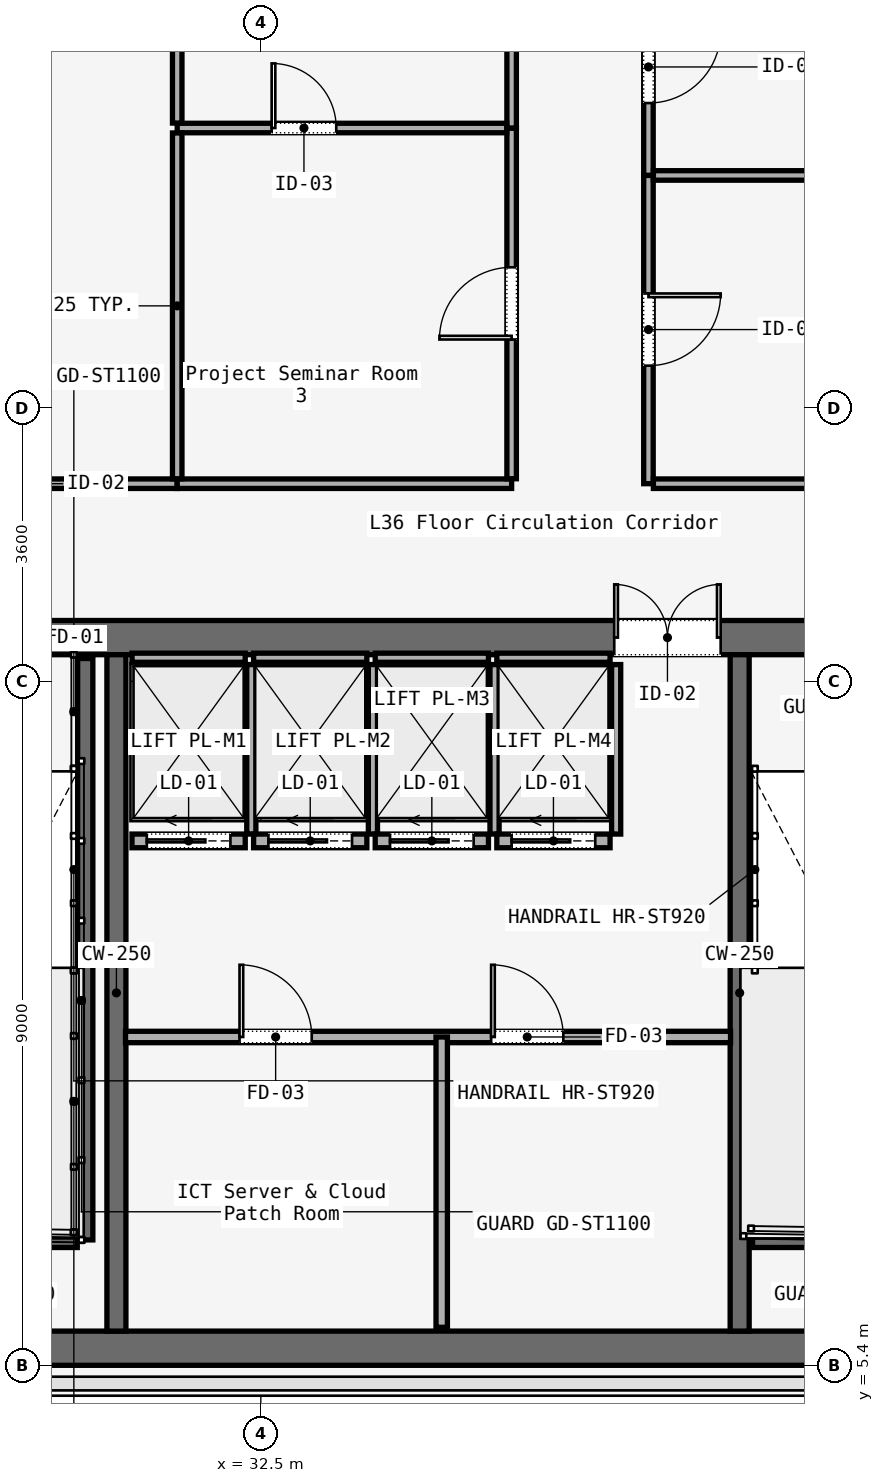
"""IFC4 building model, lengths in metres.
Left out: names, types, materials, properties, quantities, classifications, styles, units other than length and angle.
Written with IfcOpenShell. Run it as: python <this file> out.ifc"""

import sys

from ifc_helpers import new_model, si_unit, direction, frame, frame_2d, origin, place, context, subcontext, project, spatial, rectangle, extrude, element, fill, save


model = new_model("IFC4")
c1 = context("Model", 3, precision=1e-05, world=origin(), true_north=direction((0.0, 1.0)))
c2 = subcontext(c1, "Body", "Model", "MODEL_VIEW")
j1 = project(units=[si_unit("LENGTHUNIT", "METRE"), si_unit("PLANEANGLEUNIT", "RADIAN")], contexts=[c1])
p1 = place(None, origin())
s1 = spatial("IfcSite", under=j1, at=p1, CompositionType="ELEMENT")
p2 = place(p1, origin())
s2 = spatial("IfcBuilding", under=s1, at=p2, CompositionType="ELEMENT")
p3 = place(p2, frame((0.0, 0.0, 153.6)))
s3 = spatial("IfcBuildingStorey", under=s2, at=p3, CompositionType="ELEMENT", Elevation=153.6)
p4 = place(p3, frame((26.45, 14.975, 0.0), z_axis=(0.0, 0.0, 1.0), x_axis=(1.0, 0.0, 0.0)))
e1 = element("IfcWall", 1, at=p4, inside=s3, PredefinedType="SOLIDWALL", context=c2, shape_type="SweptSolid", body=[
    extrude(rectangle(XDim=31.1, YDim=0.45, at=frame_2d((15.55, 0.0))), origin(), (0.0, 0.0, 1.0), 3.58),
])
p5 = place(p4, frame((1.65, 0.0, 0.0)))
e2 = element("IfcOpeningElement", 2, at=p5, cuts=e1, PredefinedType="OPENING", context=c2, shape_type="SweptSolid", body=[
    extrude(rectangle(XDim=1.1, YDim=2.2, at=frame_2d((0.55, 1.1))), frame((0.0, 0.225, 0.0), z_axis=(0.0, -1.0, 0.0), x_axis=(1.0, 0.0, 0.0)), (0.0, 0.0, 1.0), 0.45),
])
p6 = place(p4, frame((13.65, 0.0, 0.0)))
e3 = element("IfcOpeningElement", 3, at=p6, cuts=e1, PredefinedType="OPENING", context=c2, shape_type="SweptSolid", body=[
    extrude(rectangle(XDim=1.1, YDim=2.2, at=frame_2d((0.55, 1.1))), frame((0.0, 0.225, 0.0), z_axis=(0.0, -1.0, 0.0), x_axis=(1.0, 0.0, 0.0)), (0.0, 0.0, 1.0), 0.45),
])
p7 = place(p4, frame((25.55, 0.0, 0.0)))
e4 = element("IfcOpeningElement", 4, at=p7, cuts=e1, PredefinedType="OPENING", context=c2, shape_type="SweptSolid", body=[
    extrude(rectangle(XDim=1.1, YDim=2.2, at=frame_2d((0.55, 1.1))), frame((0.0, 0.225, 0.0), z_axis=(0.0, -1.0, 0.0), x_axis=(1.0, 0.0, 0.0)), (0.0, 0.0, 1.0), 0.45),
])
p8 = place(p4, frame((10.7, 0.0, 0.0)))
e5 = element("IfcOpeningElement", 5, at=p8, cuts=e1, PredefinedType="OPENING", context=c2, shape_type="SweptSolid", body=[
    extrude(rectangle(XDim=1.4, YDim=2.2, at=frame_2d((0.7, 1.1))), frame((0.0, 0.225, 0.0), z_axis=(0.0, -1.0, 0.0), x_axis=(1.0, 0.0, 0.0)), (0.0, 0.0, 1.0), 0.45),
])
p9 = place(p4, frame((19.35, 0.0, 0.0)))
e6 = element("IfcOpeningElement", 6, at=p9, cuts=e1, PredefinedType="OPENING", context=c2, shape_type="SweptSolid", body=[
    extrude(rectangle(XDim=1.1, YDim=2.2, at=frame_2d((0.55, 1.1))), frame((0.0, 0.225, 0.0), z_axis=(0.0, -1.0, 0.0), x_axis=(1.0, 0.0, 0.0)), (0.0, 0.0, 1.0), 0.45),
])
p10 = place(p4, frame((21.4, 0.0, 0.0)))
e7 = element("IfcOpeningElement", 7, at=p10, cuts=e1, PredefinedType="OPENING", context=c2, shape_type="SweptSolid", body=[
    extrude(rectangle(XDim=0.9, YDim=2.1, at=frame_2d((0.45, 1.05))), frame((0.0, 0.225, 0.0), z_axis=(0.0, -1.0, 0.0), x_axis=(1.0, 0.0, 0.0)), (0.0, 0.0, 1.0), 0.45),
])
p11 = place(p4, frame((23.35, 0.0, 0.0)))
e8 = element("IfcOpeningElement", 8, at=p11, cuts=e1, PredefinedType="OPENING", context=c2, shape_type="SweptSolid", body=[
    extrude(rectangle(XDim=1.3, YDim=2.3, at=frame_2d((0.65, 1.15))), frame((0.0, 0.225, 0.0), z_axis=(0.0, -1.0, 0.0), x_axis=(1.0, 0.0, 0.0)), (0.0, 0.0, 1.0), 0.45),
])
p12 = place(p3, frame((26.45, 5.625, 0.0), z_axis=(0.0, 0.0, 1.0), x_axis=(1.0, 0.0, 0.0)))
e9 = element("IfcWall", 9, at=p12, inside=s3, PredefinedType="SOLIDWALL", context=c2, shape_type="SweptSolid", body=[
    extrude(rectangle(XDim=31.1, YDim=0.45, at=frame_2d((15.55, 0.0))), origin(), (0.0, 0.0, 1.0), 3.58),
])
for number, where, z_axis, x_axis in (
    (10, (30.6, 5.85, 0.0), (0.0, 0.0, 1.0), (0.0, 1.0, 0.0)),
    (11, (38.8, 5.85, 0.0), (0.0, 0.0, 1.0), (0.0, 1.0, 0.0)),
):
    element("IfcWall", number, at=place(p3, frame(where, z_axis=z_axis, x_axis=x_axis)), inside=s3, PredefinedType="SOLIDWALL", context=c2, shape_type="SweptSolid", body=[
        extrude(rectangle(XDim=8.9, YDim=0.25, at=frame_2d((4.45, 0.0))), origin(), (0.0, 0.0, 1.0), 3.58),
    ])
p13 = place(p3, frame((30.19, 14.7, 0.0), z_axis=(0.0, 0.0, 1.0), x_axis=(0.0, -1.0, 0.0)))
e12 = element("IfcWall", 12, at=p13, inside=s3, PredefinedType="SOLIDWALL", context=c2, shape_type="SweptSolid", body=[
    extrude(rectangle(XDim=7.65, YDim=0.2, at=frame_2d((3.825, 0.0))), origin(), (0.0, 0.0, 1.0), 3.8),
])
for number, where, z_axis, x_axis in (
    (13, (26.97, 7.05, 0.0), (0.0, 0.0, 1.0), (1.0, 0.0, 0.0)),
    (14, (38.97, 7.05, 0.0), (0.0, 0.0, 1.0), (1.0, 0.0, 0.0)),
):
    element("IfcWall", number, at=place(p3, frame(where, z_axis=z_axis, x_axis=x_axis)), inside=s3, PredefinedType="SOLIDWALL", context=c2, shape_type="SweptSolid", body=[
        extrude(rectangle(XDim=3.115, YDim=0.2, at=frame_2d((1.558, 0.0))), origin(), (0.0, 0.0, 1.0), 3.8),
    ])
p14 = place(p3, frame((30.72, 9.72, 0.0), z_axis=(0.0, 0.0, 1.0), x_axis=(1.0, 0.0, 0.0)))
e15 = element("IfcWall", 15, at=p14, inside=s3, PredefinedType="PARTITIONING", context=c2, shape_type="SweptSolid", body=[
    extrude(rectangle(XDim=7.96, YDim=0.15, at=frame_2d((3.98, 0.0))), origin(), (0.0, 0.0, 1.0), 3.01),
])
p15 = place(p14, frame((1.5, 0.0, 0.0)))
e16 = element("IfcOpeningElement", 16, at=p15, cuts=e15, PredefinedType="OPENING", context=c2, shape_type="SweptSolid", body=[
    extrude(rectangle(XDim=0.95, YDim=2.2, at=frame_2d((0.475, 1.1))), frame((0.0, 0.075, 0.0), z_axis=(0.0, -1.0, 0.0), x_axis=(1.0, 0.0, 0.0)), (0.0, 0.0, 1.0), 0.15),
])
p16 = place(p14, frame((4.81, 0.0, 0.0)))
e17 = element("IfcOpeningElement", 17, at=p16, cuts=e15, PredefinedType="OPENING", context=c2, shape_type="SweptSolid", body=[
    extrude(rectangle(XDim=0.95, YDim=2.2, at=frame_2d((0.475, 1.1))), frame((0.0, 0.075, 0.0), z_axis=(0.0, -1.0, 0.0), x_axis=(1.0, 0.0, 0.0)), (0.0, 0.0, 1.0), 0.15),
])
p17 = place(p3, frame((34.88, 5.9, 0.0), z_axis=(0.0, 0.0, 1.0), x_axis=(0.0, 1.0, 0.0)))
e18 = element("IfcWall", 18, at=p17, inside=s3, PredefinedType="PARTITIONING", context=c2, shape_type="SweptSolid", body=[
    extrude(rectangle(XDim=3.82, YDim=0.15, at=frame_2d((1.91, 0.0))), origin(), (0.0, 0.0, 1.0), 3.01),
])
p18 = place(p3, frame((30.805, 12.3, 0.0), z_axis=(0.0, 0.0, 1.0), x_axis=(1.0, 0.0, 0.0)))
e19 = element("IfcWall", 19, at=p18, inside=s3, PredefinedType="SOLIDWALL", context=c2, shape_type="SweptSolid", body=[
    extrude(rectangle(XDim=1.49, YDim=0.18, at=frame_2d((0.745, 0.0))), origin(), (0.0, 0.0, 1.0), 3.01),
])
p19 = place(p18, frame((0.195, 0.0, 0.0)))
e20 = element("IfcOpeningElement", 20, at=p19, cuts=e19, PredefinedType="OPENING", context=c2, shape_type="SweptSolid", body=[
    extrude(rectangle(XDim=1.1, YDim=2.2, at=frame_2d((0.55, 1.1))), frame((0.0, 0.09, 0.0), z_axis=(0.0, -1.0, 0.0), x_axis=(1.0, 0.0, 0.0)), (0.0, 0.0, 1.0), 0.18),
])
p20 = place(p3, frame((30.805, 14.71, 0.0), z_axis=(0.0, 0.0, 1.0), x_axis=(1.0, 0.0, 0.0)))
e21 = element("IfcWall", 21, at=p20, inside=s3, PredefinedType="SOLIDWALL", context=c2, shape_type="SweptSolid", body=[
    extrude(rectangle(XDim=1.49, YDim=0.12, at=frame_2d((0.745, 0.0))), origin(), (0.0, 0.0, 1.0), 3.01),
])
p21 = place(p3, frame((32.375, 12.39, 0.0), z_axis=(0.0, 0.0, 1.0), x_axis=(0.0, 1.0, 0.0)))
e22 = element("IfcWall", 22, at=p21, inside=s3, PredefinedType="SOLIDWALL", context=c2, shape_type="SweptSolid", body=[
    extrude(rectangle(XDim=2.23, YDim=0.12, at=frame_2d((1.115, 0.0))), origin(), (0.0, 0.0, 1.0), 3.01),
])
p22 = place(p3, frame((32.405, 12.3, 0.0), z_axis=(0.0, 0.0, 1.0), x_axis=(1.0, 0.0, 0.0)))
e23 = element("IfcWall", 23, at=p22, inside=s3, PredefinedType="SOLIDWALL", context=c2, shape_type="SweptSolid", body=[
    extrude(rectangle(XDim=1.49, YDim=0.18, at=frame_2d((0.745, 0.0))), origin(), (0.0, 0.0, 1.0), 3.01),
])
p23 = place(p22, frame((0.195, 0.0, 0.0)))
e24 = element("IfcOpeningElement", 24, at=p23, cuts=e23, PredefinedType="OPENING", context=c2, shape_type="SweptSolid", body=[
    extrude(rectangle(XDim=1.1, YDim=2.2, at=frame_2d((0.55, 1.1))), frame((0.0, 0.09, 0.0), z_axis=(0.0, -1.0, 0.0), x_axis=(1.0, 0.0, 0.0)), (0.0, 0.0, 1.0), 0.18),
])
p24 = place(p3, frame((32.405, 14.71, 0.0), z_axis=(0.0, 0.0, 1.0), x_axis=(1.0, 0.0, 0.0)))
e25 = element("IfcWall", 25, at=p24, inside=s3, PredefinedType="SOLIDWALL", context=c2, shape_type="SweptSolid", body=[
    extrude(rectangle(XDim=1.49, YDim=0.12, at=frame_2d((0.745, 0.0))), origin(), (0.0, 0.0, 1.0), 3.01),
])
p25 = place(p3, frame((33.975, 12.39, 0.0), z_axis=(0.0, 0.0, 1.0), x_axis=(0.0, 1.0, 0.0)))
e26 = element("IfcWall", 26, at=p25, inside=s3, PredefinedType="SOLIDWALL", context=c2, shape_type="SweptSolid", body=[
    extrude(rectangle(XDim=2.23, YDim=0.12, at=frame_2d((1.115, 0.0))), origin(), (0.0, 0.0, 1.0), 3.01),
])
p26 = place(p3, frame((34.005, 12.3, 0.0), z_axis=(0.0, 0.0, 1.0), x_axis=(1.0, 0.0, 0.0)))
e27 = element("IfcWall", 27, at=p26, inside=s3, PredefinedType="SOLIDWALL", context=c2, shape_type="SweptSolid", body=[
    extrude(rectangle(XDim=1.49, YDim=0.18, at=frame_2d((0.745, 0.0))), origin(), (0.0, 0.0, 1.0), 3.01),
])
p27 = place(p26, frame((0.195, 0.0, 0.0)))
e28 = element("IfcOpeningElement", 28, at=p27, cuts=e27, PredefinedType="OPENING", context=c2, shape_type="SweptSolid", body=[
    extrude(rectangle(XDim=1.1, YDim=2.2, at=frame_2d((0.55, 1.1))), frame((0.0, 0.09, 0.0), z_axis=(0.0, -1.0, 0.0), x_axis=(1.0, 0.0, 0.0)), (0.0, 0.0, 1.0), 0.18),
])
p28 = place(p3, frame((34.005, 14.71, 0.0), z_axis=(0.0, 0.0, 1.0), x_axis=(1.0, 0.0, 0.0)))
e29 = element("IfcWall", 29, at=p28, inside=s3, PredefinedType="SOLIDWALL", context=c2, shape_type="SweptSolid", body=[
    extrude(rectangle(XDim=1.49, YDim=0.12, at=frame_2d((0.745, 0.0))), origin(), (0.0, 0.0, 1.0), 3.01),
])
p29 = place(p3, frame((35.575, 12.39, 0.0), z_axis=(0.0, 0.0, 1.0), x_axis=(0.0, 1.0, 0.0)))
e30 = element("IfcWall", 30, at=p29, inside=s3, PredefinedType="SOLIDWALL", context=c2, shape_type="SweptSolid", body=[
    extrude(rectangle(XDim=2.23, YDim=0.12, at=frame_2d((1.115, 0.0))), origin(), (0.0, 0.0, 1.0), 3.01),
])
p30 = place(p3, frame((35.605, 12.3, 0.0), z_axis=(0.0, 0.0, 1.0), x_axis=(1.0, 0.0, 0.0)))
e31 = element("IfcWall", 31, at=p30, inside=s3, PredefinedType="SOLIDWALL", context=c2, shape_type="SweptSolid", body=[
    extrude(rectangle(XDim=1.49, YDim=0.18, at=frame_2d((0.745, 0.0))), origin(), (0.0, 0.0, 1.0), 3.01),
])
p31 = place(p30, frame((0.195, 0.0, 0.0)))
e32 = element("IfcOpeningElement", 32, at=p31, cuts=e31, PredefinedType="OPENING", context=c2, shape_type="SweptSolid", body=[
    extrude(rectangle(XDim=1.1, YDim=2.2, at=frame_2d((0.55, 1.1))), frame((0.0, 0.09, 0.0), z_axis=(0.0, -1.0, 0.0), x_axis=(1.0, 0.0, 0.0)), (0.0, 0.0, 1.0), 0.18),
])
p32 = place(p3, frame((35.605, 14.71, 0.0), z_axis=(0.0, 0.0, 1.0), x_axis=(1.0, 0.0, 0.0)))
e33 = element("IfcWall", 33, at=p32, inside=s3, PredefinedType="SOLIDWALL", context=c2, shape_type="SweptSolid", body=[
    extrude(rectangle(XDim=1.49, YDim=0.12, at=frame_2d((0.745, 0.0))), origin(), (0.0, 0.0, 1.0), 3.01),
])
p33 = place(p3, frame((37.175, 12.39, 0.0), z_axis=(0.0, 0.0, 1.0), x_axis=(0.0, 1.0, 0.0)))
e34 = element("IfcWall", 34, at=p33, inside=s3, PredefinedType="SOLIDWALL", context=c2, shape_type="SweptSolid", body=[
    extrude(rectangle(XDim=2.23, YDim=0.12, at=frame_2d((1.115, 0.0))), origin(), (0.0, 0.0, 1.0), 3.01),
])
p34 = place(p3, frame((25.665, 17.0, 0.0), z_axis=(0.0, 0.0, 1.0), x_axis=(1.0, 0.0, 0.0)))
e35 = element("IfcWall", 35, at=p34, inside=s3, PredefinedType="PARTITIONING", context=c2, shape_type="SweptSolid", body=[
    extrude(rectangle(XDim=5.735, YDim=0.125, at=frame_2d((2.867, 0.0))), origin(), (0.0, 0.0, 1.0), 3.01),
])
p35 = place(p34, frame((2.167, 0.0, 0.0)))
e36 = element("IfcOpeningElement", 36, at=p35, cuts=e35, PredefinedType="OPENING", context=c2, shape_type="SweptSolid", body=[
    extrude(rectangle(XDim=1.4, YDim=2.2, at=frame_2d((0.7, 1.1))), frame((0.0, 0.062, 0.0), z_axis=(0.0, -1.0, 0.0), x_axis=(1.0, 0.0, 0.0)), (0.0, 0.0, 1.0), 0.125),
])
p36 = place(p3, frame((31.4, 17.0, 0.0), z_axis=(0.0, 0.0, 1.0), x_axis=(1.0, 0.0, 0.0)))
e37 = element("IfcWall", 37, at=p36, inside=s3, PredefinedType="PARTITIONING", context=c2, shape_type="SweptSolid", body=[
    extrude(rectangle(XDim=4.4, YDim=0.125, at=frame_2d((2.2, 0.0))), origin(), (0.0, 0.0, 1.0), 3.01),
])
p37 = place(p3, frame((35.8, 17.065, 0.0), z_axis=(0.0, 0.0, 1.0), x_axis=(0.0, 1.0, 0.0)))
e38 = element("IfcWall", 38, at=p37, inside=s3, PredefinedType="PARTITIONING", context=c2, shape_type="SweptSolid", body=[
    extrude(rectangle(XDim=4.615, YDim=0.125, at=frame_2d((2.308, 0.0))), origin(), (0.0, 0.0, 1.0), 3.01),
])
p38 = place(p37, frame((1.833, 0.0, 0.0)))
e39 = element("IfcOpeningElement", 39, at=p38, cuts=e38, PredefinedType="OPENING", context=c2, shape_type="SweptSolid", body=[
    extrude(rectangle(XDim=0.95, YDim=2.2, at=frame_2d((0.475, 1.1))), frame((0.0, 0.062, 0.0), z_axis=(0.0, -1.0, 0.0), x_axis=(1.0, 0.0, 0.0)), (0.0, 0.0, 1.0), 0.125),
])
p39 = place(p3, frame((35.8, 21.68, 0.0), z_axis=(0.0, 0.0, 1.0), x_axis=(0.0, 1.0, 0.0)))
e40 = element("IfcWall", 40, at=p39, inside=s3, PredefinedType="PARTITIONING", context=c2, shape_type="SweptSolid", body=[
    extrude(rectangle(XDim=2.574, YDim=0.125, at=frame_2d((1.287, 0.0))), origin(), (0.0, 0.0, 1.0), 3.01),
])
p40 = place(p3, frame((37.6, 23.911, 0.0), z_axis=(0.0, 0.0, 1.0), x_axis=(0.0, -1.0, 0.0)))
e41 = element("IfcWall", 41, at=p40, inside=s3, PredefinedType="PARTITIONING", context=c2, shape_type="SweptSolid", body=[
    extrude(rectangle(XDim=2.855, YDim=0.125, at=frame_2d((1.427, 0.0))), origin(), (0.0, 0.0, 1.0), 3.01),
])
p41 = place(p40, frame((0.952, 0.0, 0.0)))
e42 = element("IfcOpeningElement", 42, at=p41, cuts=e41, PredefinedType="OPENING", context=c2, shape_type="SweptSolid", body=[
    extrude(rectangle(XDim=0.95, YDim=2.2, at=frame_2d((0.475, 1.1))), frame((0.0, 0.062, 0.0), z_axis=(0.0, -1.0, 0.0), x_axis=(1.0, 0.0, 0.0)), (0.0, 0.0, 1.0), 0.125),
])
p42 = place(p3, frame((37.6, 21.056, 0.0), z_axis=(0.0, 0.0, 1.0), x_axis=(0.0, -1.0, 0.0)))
e43 = element("IfcWall", 43, at=p42, inside=s3, PredefinedType="PARTITIONING", context=c2, shape_type="SweptSolid", body=[
    extrude(rectangle(XDim=4.056, YDim=0.125, at=frame_2d((2.028, 0.0))), origin(), (0.0, 0.0, 1.0), 3.01),
])
p43 = place(p42, frame((1.553, 0.0, 0.0)))
e44 = element("IfcOpeningElement", 44, at=p43, cuts=e43, PredefinedType="OPENING", context=c2, shape_type="SweptSolid", body=[
    extrude(rectangle(XDim=0.95, YDim=2.2, at=frame_2d((0.475, 1.1))), frame((0.0, 0.062, 0.0), z_axis=(0.0, -1.0, 0.0), x_axis=(1.0, 0.0, 0.0)), (0.0, 0.0, 1.0), 0.125),
])
p44 = place(p3, frame((37.665, 17.0, 0.0), z_axis=(0.0, 0.0, 1.0), x_axis=(1.0, 0.0, 0.0)))
e45 = element("IfcWall", 45, at=p44, inside=s3, PredefinedType="PARTITIONING", context=c2, shape_type="SweptSolid", body=[
    extrude(rectangle(XDim=3.445, YDim=0.125, at=frame_2d((1.723, 0.0))), origin(), (0.0, 0.0, 1.0), 3.01),
])
p45 = place(p3, frame((37.665, 21.056, 0.0), z_axis=(0.0, 0.0, 1.0), x_axis=(1.0, 0.0, 0.0)))
e46 = element("IfcWall", 46, at=p45, inside=s3, PredefinedType="PARTITIONING", context=c2, shape_type="SweptSolid", body=[
    extrude(rectangle(XDim=3.38, YDim=0.125, at=frame_2d((1.69, 0.0))), origin(), (0.0, 0.0, 1.0), 3.01),
])
p46 = place(p3, frame((31.4, 21.68, 0.0), z_axis=(0.0, 0.0, 1.0), x_axis=(1.0, 0.0, 0.0)))
e47 = element("IfcWall", 47, at=p46, inside=s3, PredefinedType="PARTITIONING", context=c2, shape_type="SweptSolid", body=[
    extrude(rectangle(XDim=4.335, YDim=0.125, at=frame_2d((2.167, 0.0))), origin(), (0.0, 0.0, 1.0), 3.01),
])
p47 = place(p46, frame((1.242, 0.0, 0.0)))
e48 = element("IfcOpeningElement", 48, at=p47, cuts=e47, PredefinedType="OPENING", context=c2, shape_type="SweptSolid", body=[
    extrude(rectangle(XDim=0.85, YDim=2.15, at=frame_2d((0.425, 1.075))), frame((0.0, 0.062, 0.0), z_axis=(0.0, -1.0, 0.0), x_axis=(1.0, 0.0, 0.0)), (0.0, 0.0, 1.0), 0.125),
])
p48 = place(p3, frame((31.4, 17.065, 0.0), z_axis=(0.0, 0.0, 1.0), x_axis=(0.0, 1.0, 0.0)))
e49 = element("IfcWall", 49, at=p48, inside=s3, PredefinedType="PARTITIONING", context=c2, shape_type="SweptSolid", body=[
    extrude(rectangle(XDim=4.55, YDim=0.125, at=frame_2d((2.275, 0.0))), origin(), (0.0, 0.0, 1.0), 3.01),
])
p49 = place(p3, frame((31.4, 24.254, 0.0), z_axis=(0.0, 0.0, 1.0), x_axis=(0.0, -1.0, 0.0)))
e50 = element("IfcWall", 50, at=p49, inside=s3, PredefinedType="PARTITIONING", context=c2, shape_type="SweptSolid", body=[
    extrude(rectangle(XDim=2.509, YDim=0.125, at=frame_2d((1.254, 0.0))), origin(), (0.0, 0.0, 1.0), 3.01),
])
p50 = place(p8, origin())
e51 = element("IfcDoor", 51, at=p50, inside=s3, OperationType="DOUBLE_DOOR_SINGLE_SWING", PredefinedType="DOOR", context=c2, shape_type="SweptSolid", body=[
    extrude(rectangle(XDim=1.4, YDim=2.2, at=frame_2d((0.7, 1.1))), frame((0.0, 0.025, 0.0), z_axis=(0.0, -1.0, 0.0), x_axis=(1.0, 0.0, 0.0)), (0.0, 0.0, 1.0), 0.05),
])
fill(e5, e51)
p51 = place(p15, origin())
e52 = element("IfcDoor", 52, at=p51, inside=s3, OperationType="SINGLE_SWING_LEFT", PredefinedType="DOOR", context=c2, shape_type="SweptSolid", body=[
    extrude(rectangle(XDim=0.95, YDim=2.2, at=frame_2d((0.475, 1.1))), frame((0.0, 0.025, 0.0), z_axis=(0.0, -1.0, 0.0), x_axis=(1.0, 0.0, 0.0)), (0.0, 0.0, 1.0), 0.05),
])
fill(e16, e52)
p52 = place(p16, origin())
e53 = element("IfcDoor", 53, at=p52, inside=s3, OperationType="SINGLE_SWING_RIGHT", PredefinedType="DOOR", context=c2, shape_type="SweptSolid", body=[
    extrude(rectangle(XDim=0.95, YDim=2.2, at=frame_2d((0.475, 1.1))), frame((0.0, 0.025, 0.0), z_axis=(0.0, -1.0, 0.0), x_axis=(1.0, 0.0, 0.0)), (0.0, 0.0, 1.0), 0.05),
])
fill(e17, e53)
p53 = place(p19, origin())
e54 = element("IfcDoor", 54, at=p53, inside=s3, OperationType="SLIDING_TO_LEFT", PredefinedType="DOOR", context=c2, shape_type="SweptSolid", body=[
    extrude(rectangle(XDim=1.1, YDim=2.2, at=frame_2d((0.55, 1.1))), frame((0.0, 0.025, 0.0), z_axis=(0.0, -1.0, 0.0), x_axis=(1.0, 0.0, 0.0)), (0.0, 0.0, 1.0), 0.05),
])
fill(e20, e54)
p54 = place(p23, origin())
e55 = element("IfcDoor", 55, at=p54, inside=s3, OperationType="SLIDING_TO_LEFT", PredefinedType="DOOR", context=c2, shape_type="SweptSolid", body=[
    extrude(rectangle(XDim=1.1, YDim=2.2, at=frame_2d((0.55, 1.1))), frame((0.0, 0.025, 0.0), z_axis=(0.0, -1.0, 0.0), x_axis=(1.0, 0.0, 0.0)), (0.0, 0.0, 1.0), 0.05),
])
fill(e24, e55)
p55 = place(p27, origin())
e56 = element("IfcDoor", 56, at=p55, inside=s3, OperationType="SLIDING_TO_LEFT", PredefinedType="DOOR", context=c2, shape_type="SweptSolid", body=[
    extrude(rectangle(XDim=1.1, YDim=2.2, at=frame_2d((0.55, 1.1))), frame((0.0, 0.025, 0.0), z_axis=(0.0, -1.0, 0.0), x_axis=(1.0, 0.0, 0.0)), (0.0, 0.0, 1.0), 0.05),
])
fill(e28, e56)
p56 = place(p31, origin())
e57 = element("IfcDoor", 57, at=p56, inside=s3, OperationType="SLIDING_TO_LEFT", PredefinedType="DOOR", context=c2, shape_type="SweptSolid", body=[
    extrude(rectangle(XDim=1.1, YDim=2.2, at=frame_2d((0.55, 1.1))), frame((0.0, 0.025, 0.0), z_axis=(0.0, -1.0, 0.0), x_axis=(1.0, 0.0, 0.0)), (0.0, 0.0, 1.0), 0.05),
])
fill(e32, e57)
p57 = place(p43, origin())
e58 = element("IfcDoor", 58, at=p57, inside=s3, OperationType="SINGLE_SWING_LEFT", PredefinedType="DOOR", context=c2, shape_type="SweptSolid", body=[
    extrude(rectangle(XDim=0.95, YDim=2.2, at=frame_2d((0.475, 1.1))), frame((0.0, 0.025, 0.0), z_axis=(0.0, -1.0, 0.0), x_axis=(1.0, 0.0, 0.0)), (0.0, 0.0, 1.0), 0.05),
])
fill(e44, e58)
p58 = place(p38, origin())
e59 = element("IfcDoor", 59, at=p58, inside=s3, OperationType="SINGLE_SWING_LEFT", PredefinedType="DOOR", context=c2, shape_type="SweptSolid", body=[
    extrude(rectangle(XDim=0.95, YDim=2.2, at=frame_2d((0.475, 1.1))), frame((0.0, 0.025, 0.0), z_axis=(0.0, -1.0, 0.0), x_axis=(1.0, 0.0, 0.0)), (0.0, 0.0, 1.0), 0.05),
])
fill(e39, e59)
p59 = place(p41, origin())
e60 = element("IfcDoor", 60, at=p59, inside=s3, OperationType="SINGLE_SWING_LEFT", PredefinedType="DOOR", context=c2, shape_type="SweptSolid", body=[
    extrude(rectangle(XDim=0.95, YDim=2.2, at=frame_2d((0.475, 1.1))), frame((0.0, 0.025, 0.0), z_axis=(0.0, -1.0, 0.0), x_axis=(1.0, 0.0, 0.0)), (0.0, 0.0, 1.0), 0.05),
])
fill(e42, e60)
p60 = place(p47, origin())
e61 = element("IfcDoor", 61, at=p60, inside=s3, OperationType="SINGLE_SWING_LEFT", PredefinedType="DOOR", context=c2, shape_type="SweptSolid", body=[
    extrude(rectangle(XDim=0.85, YDim=2.15, at=frame_2d((0.425, 1.075))), frame((0.0, 0.025, 0.0), z_axis=(0.0, -1.0, 0.0), x_axis=(1.0, 0.0, 0.0)), (0.0, 0.0, 1.0), 0.05),
])
fill(e48, e61)
save(model, sys.argv[1])
